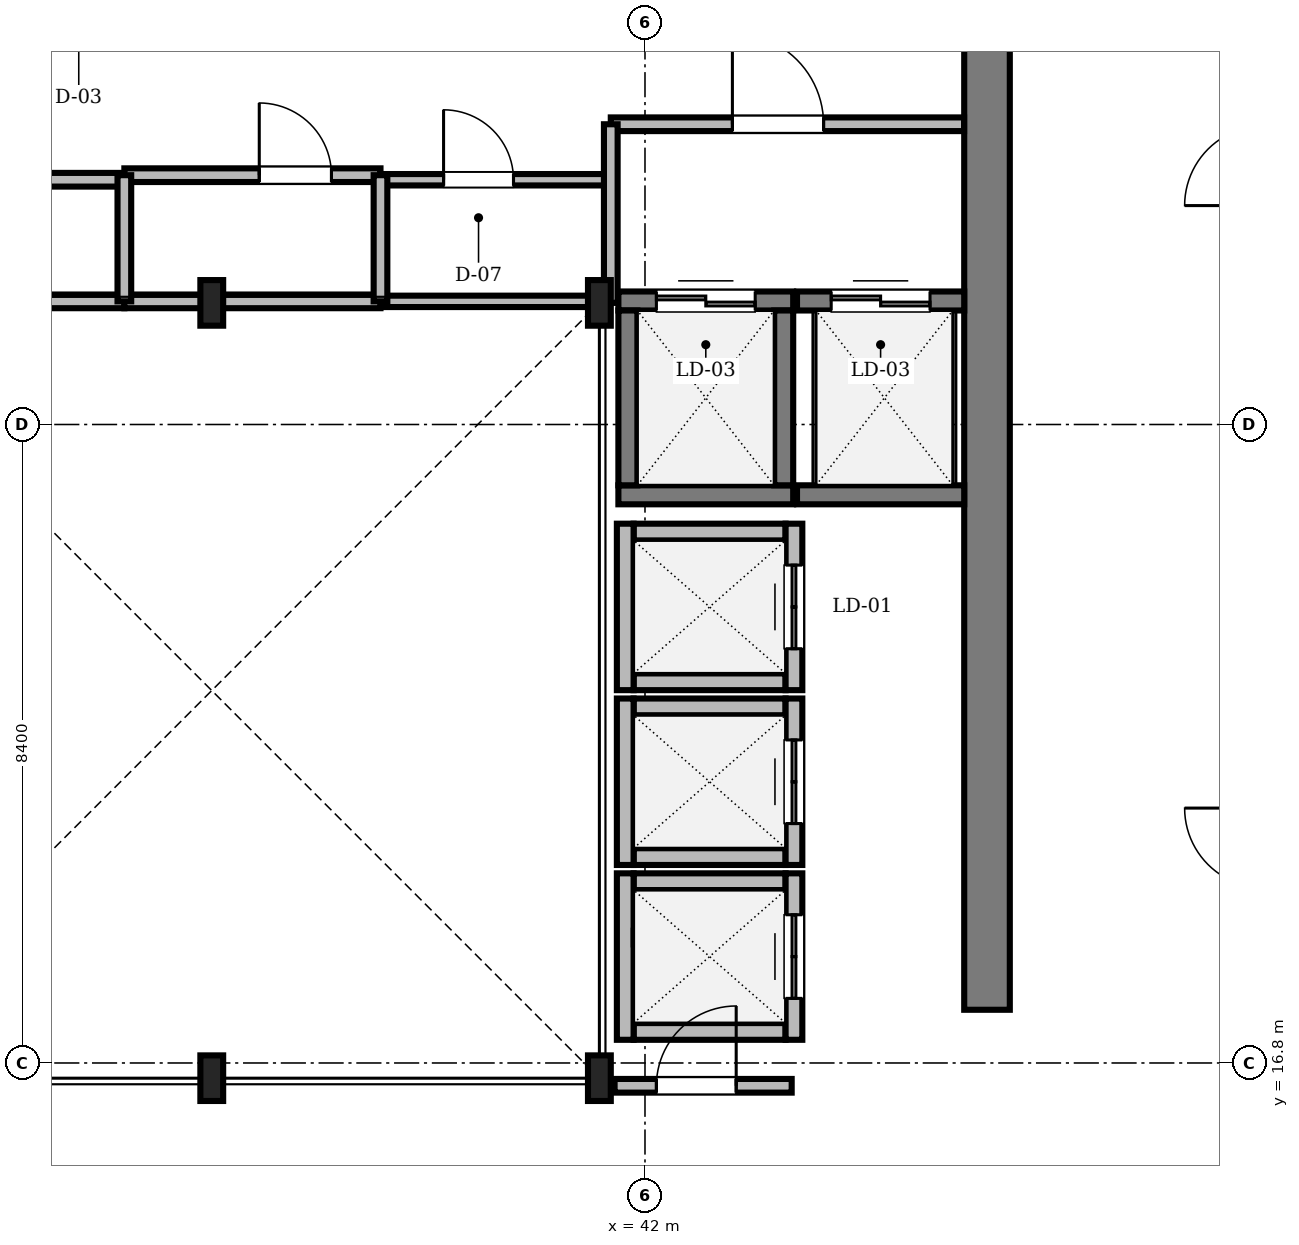
"""IFC4 building model, lengths in metres.
Left out: names, types, materials, properties, quantities, classifications, styles, units other than length and angle.
Written with IfcOpenShell. Run it as: python <this file> out.ifc"""

import sys

from ifc_helpers import new_model, si_unit, direction, frame, frame_2d, origin, origin_2d, place, context, subcontext, project, spatial, rectangle, i_section, extrude, source, transform, mapped, element, fill, save


model = new_model("IFC4")
c1 = context("Model", 3, precision=1e-05, world=origin(), true_north=direction((0.0, 1.0)))
c2 = subcontext(c1, "Body", "Model", "MODEL_VIEW")
j1 = project(units=[si_unit("LENGTHUNIT", "METRE"), si_unit("PLANEANGLEUNIT", "RADIAN")], contexts=[c1])
p1 = place(None, origin())
s1 = spatial("IfcSite", under=j1, at=p1, CompositionType="ELEMENT")
p2 = place(p1, origin())
s2 = spatial("IfcBuilding", under=s1, at=p2, CompositionType="ELEMENT")
p3 = place(p2, frame((0.0, 0.0, 278.25)))
s3 = spatial("IfcBuildingStorey", under=s2, at=p3, CompositionType="ELEMENT", Elevation=278.25)
m1 = source(origin(), c2, "Body", "SweptSolid", [
    extrude(rectangle(XDim=13.15, YDim=0.6, at=frame_2d((6.575, 0.0))), origin(), (0.0, 0.0, 1.0), 3.3),
])
p4 = place(p3, frame((46.5, 17.5, 0.0), z_axis=(0.0, 0.0, 1.0), x_axis=(0.0, 1.0, 0.0)))
e1 = element("IfcWall", 1, at=p4, inside=s3, PredefinedType="SHEAR", context=c2, shape_type="MappedRepresentation", body=[
    mapped(m1, transform((0.0, 0.0, 0.0), scale=1.0)),
])
m2 = source(origin(), c2, "Body", "SweptSolid", [
    extrude(i_section(OverallWidth=0.3, OverallDepth=0.6, WebThickness=0.015, FlangeThickness=0.03, FilletRadius=0.027, at=origin_2d()), origin(), (0.0, 0.0, 1.0), 3.3),
])
for number, where, z_axis, x_axis in (
    (2, (36.3, 16.6, 0.0), (0.0, 0.0, 1.0), (1.0, 0.0, 0.0)),
    (3, (41.4, 16.6, 0.0), (0.0, 0.0, 1.0), (1.0, 0.0, 0.0)),
    (4, (41.4, 26.8, 0.0), (0.0, 0.0, 1.0), (1.0, 0.0, 0.0)),
    (5, (36.3, 26.8, 0.0), (0.0, 0.0, 1.0), (1.0, 0.0, 0.0)),
):
    element("IfcColumn", number, at=place(p3, frame(where, z_axis=z_axis, x_axis=x_axis)), inside=s3, PredefinedType="COLUMN", context=c2, shape_type="MappedRepresentation", body=[
        mapped(m2, transform((0.0, 0.0, 0.0), scale=1.0)),
    ])
m3 = source(origin(), c2, "Body", "SweptSolid", [
    extrude(rectangle(XDim=2.0, YDim=0.22, at=frame_2d((1.0, 0.0))), origin(), (0.0, 0.0, 1.0), 3.3),
])
for number, where, z_axis, x_axis in (
    (6, (41.85, 21.815, 0.0), (0.0, 0.0, 1.0), (1.0, 0.0, 0.0)),
    (7, (41.85, 23.785, 0.0), (0.0, 0.0, 1.0), (1.0, 0.0, 0.0)),
):
    element("IfcWall", number, at=place(p3, frame(where, z_axis=z_axis, x_axis=x_axis)), inside=s3, PredefinedType="SOLIDWALL", context=c2, shape_type="MappedRepresentation", body=[
        mapped(m3, transform((0.0, 0.0, 0.0), scale=1.0)),
    ])
m4 = source(origin(), c2, "Body", "SweptSolid", [
    extrude(rectangle(XDim=2.19, YDim=0.22, at=frame_2d((1.095, 0.0))), origin(), (0.0, 0.0, 1.0), 3.3),
])
p5 = place(p3, frame((41.74, 21.705, 0.0), z_axis=(0.0, 0.0, 1.0), x_axis=(0.0, 1.0, 0.0)))
e8 = element("IfcWall", 8, at=p5, inside=s3, PredefinedType="SOLIDWALL", context=c2, shape_type="MappedRepresentation", body=[
    mapped(m4, transform((0.0, 0.0, 0.0), scale=1.0)),
])
p6 = place(p3, frame((43.96, 21.705, 0.0), z_axis=(0.0, 0.0, 1.0), x_axis=(0.0, 1.0, 0.0)))
e9 = element("IfcWall", 9, at=p6, inside=s3, PredefinedType="SOLIDWALL", context=c2, shape_type="MappedRepresentation", body=[
    mapped(m4, transform((0.0, 0.0, 0.0), scale=1.0)),
])
m5 = source(origin(), c2, "Body", "SweptSolid", [
    extrude(rectangle(XDim=1.1, YDim=2.2, at=frame_2d((0.55, 1.1))), frame((0.0, 0.12, 0.0), z_axis=(0.0, -1.0, 0.0), x_axis=(1.0, 0.0, 0.0)), (0.0, 0.0, 1.0), 0.24),
])
p7 = place(p6, frame((0.545, 0.0, 0.0)))
e10 = element("IfcOpeningElement", 10, at=p7, cuts=e9, PredefinedType="OPENING", context=c2, shape_type="MappedRepresentation", body=[
    mapped(m5, transform((0.0, 0.0, 0.0), scale=1.0)),
])
for number, where, z_axis, x_axis in (
    (11, (41.85, 19.515, 0.0), (0.0, 0.0, 1.0), (1.0, 0.0, 0.0)),
    (12, (41.85, 21.485, 0.0), (0.0, 0.0, 1.0), (1.0, 0.0, 0.0)),
):
    element("IfcWall", number, at=place(p3, frame(where, z_axis=z_axis, x_axis=x_axis)), inside=s3, PredefinedType="SOLIDWALL", context=c2, shape_type="MappedRepresentation", body=[
        mapped(m3, transform((0.0, 0.0, 0.0), scale=1.0)),
    ])
p8 = place(p3, frame((41.74, 19.405, 0.0), z_axis=(0.0, 0.0, 1.0), x_axis=(0.0, 1.0, 0.0)))
e13 = element("IfcWall", 13, at=p8, inside=s3, PredefinedType="SOLIDWALL", context=c2, shape_type="MappedRepresentation", body=[
    mapped(m4, transform((0.0, 0.0, 0.0), scale=1.0)),
])
p9 = place(p3, frame((43.96, 19.405, 0.0), z_axis=(0.0, 0.0, 1.0), x_axis=(0.0, 1.0, 0.0)))
e14 = element("IfcWall", 14, at=p9, inside=s3, PredefinedType="SOLIDWALL", context=c2, shape_type="MappedRepresentation", body=[
    mapped(m4, transform((0.0, 0.0, 0.0), scale=1.0)),
])
p10 = place(p9, frame((0.545, 0.0, 0.0)))
e15 = element("IfcOpeningElement", 15, at=p10, cuts=e14, PredefinedType="OPENING", context=c2, shape_type="MappedRepresentation", body=[
    mapped(m5, transform((0.0, 0.0, 0.0), scale=1.0)),
])
for number, where, z_axis, x_axis in (
    (16, (41.85, 17.215, 0.0), (0.0, 0.0, 1.0), (1.0, 0.0, 0.0)),
    (17, (41.85, 19.185, 0.0), (0.0, 0.0, 1.0), (1.0, 0.0, 0.0)),
):
    element("IfcWall", number, at=place(p3, frame(where, z_axis=z_axis, x_axis=x_axis)), inside=s3, PredefinedType="SOLIDWALL", context=c2, shape_type="MappedRepresentation", body=[
        mapped(m3, transform((0.0, 0.0, 0.0), scale=1.0)),
    ])
p11 = place(p3, frame((41.74, 17.105, 0.0), z_axis=(0.0, 0.0, 1.0), x_axis=(0.0, 1.0, 0.0)))
e18 = element("IfcWall", 18, at=p11, inside=s3, PredefinedType="SOLIDWALL", context=c2, shape_type="MappedRepresentation", body=[
    mapped(m4, transform((0.0, 0.0, 0.0), scale=1.0)),
])
p12 = place(p3, frame((43.96, 17.105, 0.0), z_axis=(0.0, 0.0, 1.0), x_axis=(0.0, 1.0, 0.0)))
e19 = element("IfcWall", 19, at=p12, inside=s3, PredefinedType="SOLIDWALL", context=c2, shape_type="MappedRepresentation", body=[
    mapped(m4, transform((0.0, 0.0, 0.0), scale=1.0)),
])
p13 = place(p12, frame((0.545, 0.0, 0.0)))
e20 = element("IfcOpeningElement", 20, at=p13, cuts=e19, PredefinedType="OPENING", context=c2, shape_type="MappedRepresentation", body=[
    mapped(m5, transform((0.0, 0.0, 0.0), scale=1.0)),
])
m6 = source(origin(), c2, "Body", "SweptSolid", [
    extrude(rectangle(XDim=2.3, YDim=0.25, at=frame_2d((1.15, 0.0))), origin(), (0.0, 0.0, 1.0), 3.3),
])
p14 = place(p3, frame((41.65, 24.275, 0.0), z_axis=(0.0, 0.0, 1.0), x_axis=(1.0, 0.0, 0.0)))
e21 = element("IfcWall", 21, at=p14, inside=s3, PredefinedType="SOLIDWALL", context=c2, shape_type="MappedRepresentation", body=[
    mapped(m6, transform((0.0, 0.0, 0.0), scale=1.0)),
])
p15 = place(p3, frame((41.65, 26.825, 0.0), z_axis=(0.0, 0.0, 1.0), x_axis=(1.0, 0.0, 0.0)))
e22 = element("IfcWall", 22, at=p15, inside=s3, PredefinedType="SOLIDWALL", context=c2, shape_type="MappedRepresentation", body=[
    mapped(m6, transform((0.0, 0.0, 0.0), scale=1.0)),
])
m7 = source(origin(), c2, "Body", "SweptSolid", [
    extrude(rectangle(XDim=1.3, YDim=2.3, at=frame_2d((0.65, 1.15))), frame((0.0, 0.135, 0.0), z_axis=(0.0, -1.0, 0.0), x_axis=(1.0, 0.0, 0.0)), (0.0, 0.0, 1.0), 0.27),
])
p16 = place(p15, frame((0.5, 0.0, 0.0)))
e23 = element("IfcOpeningElement", 23, at=p16, cuts=e22, PredefinedType="OPENING", context=c2, shape_type="MappedRepresentation", body=[
    mapped(m7, transform((0.0, 0.0, 0.0), scale=1.0)),
])
for number, where, z_axis, x_axis in (
    (24, (41.775, 24.4, 0.0), (0.0, 0.0, 1.0), (0.0, 1.0, 0.0)),
    (25, (43.825, 24.4, 0.0), (0.0, 0.0, 1.0), (0.0, 1.0, 0.0)),
):
    element("IfcWall", number, at=place(p3, frame(where, z_axis=z_axis, x_axis=x_axis)), inside=s3, PredefinedType="SOLIDWALL", context=c2, shape_type="MappedRepresentation", body=[
        mapped(m6, transform((0.0, 0.0, 0.0), scale=1.0)),
    ])
m8 = source(origin(), c2, "Body", "SweptSolid", [
    extrude(rectangle(XDim=2.2, YDim=0.25, at=frame_2d((1.1, 0.0))), origin(), (0.0, 0.0, 1.0), 3.3),
])
p17 = place(p3, frame((44.0, 24.275, 0.0), z_axis=(0.0, 0.0, 1.0), x_axis=(1.0, 0.0, 0.0)))
e26 = element("IfcWall", 26, at=p17, inside=s3, PredefinedType="SOLIDWALL", context=c2, shape_type="MappedRepresentation", body=[
    mapped(m8, transform((0.0, 0.0, 0.0), scale=1.0)),
])
p18 = place(p3, frame((44.0, 26.825, 0.0), z_axis=(0.0, 0.0, 1.0), x_axis=(1.0, 0.0, 0.0)))
e27 = element("IfcWall", 27, at=p18, inside=s3, PredefinedType="SOLIDWALL", context=c2, shape_type="MappedRepresentation", body=[
    mapped(m8, transform((0.0, 0.0, 0.0), scale=1.0)),
])
p19 = place(p18, frame((0.45, 0.0, 0.0)))
e28 = element("IfcOpeningElement", 28, at=p19, cuts=e27, PredefinedType="OPENING", context=c2, shape_type="MappedRepresentation", body=[
    mapped(m7, transform((0.0, 0.0, 0.0), scale=1.0)),
])
m9 = source(origin(), c2, "Body", "SweptSolid", [
    extrude(rectangle(XDim=4.648, YDim=0.18, at=frame_2d((2.324, 0.0))), origin(), (0.0, 0.0, 1.0), 2.932),
])
p20 = place(p3, frame((41.55, 29.15, 0.0), z_axis=(0.0, 0.0, 1.0), x_axis=(1.0, 0.0, 0.0)))
e29 = element("IfcWall", 29, at=p20, inside=s3, PredefinedType="PARTITIONING", context=c2, shape_type="MappedRepresentation", body=[
    mapped(m9, transform((0.0, 0.0, 0.0), scale=1.0)),
])
m10 = source(origin(), c2, "Body", "SweptSolid", [
    extrude(rectangle(XDim=1.2, YDim=2.2, at=frame_2d((0.6, 1.1))), frame((0.0, 0.1, 0.0), z_axis=(0.0, -1.0, 0.0), x_axis=(1.0, 0.0, 0.0)), (0.0, 0.0, 1.0), 0.2),
])
p21 = place(p20, frame((1.6, 0.0, 0.0)))
e30 = element("IfcOpeningElement", 30, at=p21, cuts=e29, PredefinedType="OPENING", context=c2, shape_type="MappedRepresentation", body=[
    mapped(m10, transform((0.0, 0.0, 0.0), scale=1.0)),
])
m11 = source(origin(), c2, "Body", "SweptSolid", [
    extrude(rectangle(XDim=3.7, YDim=0.18, at=frame_2d((1.85, 0.0))), origin(), (0.0, 0.0, 1.0), 2.932),
])
p22 = place(p3, frame((31.45, 28.42, 0.0), z_axis=(0.0, 0.0, 1.0), x_axis=(1.0, 0.0, 0.0)))
e31 = element("IfcWall", 31, at=p22, inside=s3, PredefinedType="PARTITIONING", context=c2, shape_type="MappedRepresentation", body=[
    mapped(m11, transform((0.0, 0.0, 0.0), scale=1.0)),
])
m12 = source(origin(), c2, "Body", "SweptSolid", [
    extrude(rectangle(XDim=0.92, YDim=2.1, at=frame_2d((0.46, 1.05))), frame((0.0, 0.1, 0.0), z_axis=(0.0, -1.0, 0.0), x_axis=(1.0, 0.0, 0.0)), (0.0, 0.0, 1.0), 0.2),
])
p23 = place(p22, frame((0.9, 0.0, 0.0)))
e32 = element("IfcOpeningElement", 32, at=p23, cuts=e31, PredefinedType="OPENING", context=c2, shape_type="MappedRepresentation", body=[
    mapped(m12, transform((0.0, 0.0, 0.0), scale=1.0)),
])
m13 = source(origin(), c2, "Body", "SweptSolid", [
    extrude(rectangle(XDim=3.37, YDim=0.18, at=frame_2d((1.685, 0.0))), origin(), (0.0, 0.0, 1.0), 3.3),
])
p24 = place(p3, frame((35.15, 28.48, 0.0), z_axis=(0.0, 0.0, 1.0), x_axis=(1.0, 0.0, 0.0)))
e33 = element("IfcWall", 33, at=p24, inside=s3, PredefinedType="PARTITIONING", context=c2, shape_type="MappedRepresentation", body=[
    mapped(m13, transform((0.0, 0.0, 0.0), scale=1.0)),
])
m14 = source(origin(), c2, "Body", "SweptSolid", [
    extrude(rectangle(XDim=0.95, YDim=2.15, at=frame_2d((0.475, 1.075))), frame((0.0, 0.1, 0.0), z_axis=(0.0, -1.0, 0.0), x_axis=(1.0, 0.0, 0.0)), (0.0, 0.0, 1.0), 0.2),
])
p25 = place(p24, frame((1.775, 0.0, 0.0)))
e34 = element("IfcOpeningElement", 34, at=p25, cuts=e33, PredefinedType="OPENING", context=c2, shape_type="MappedRepresentation", body=[
    mapped(m14, transform((0.0, 0.0, 0.0), scale=1.0)),
])
m15 = source(origin(), c2, "Body", "SweptSolid", [
    extrude(rectangle(XDim=3.0, YDim=0.15, at=frame_2d((1.5, 0.0))), origin(), (0.0, 0.0, 1.0), 3.3),
])
p26 = place(p3, frame((38.52, 28.42, 0.0), z_axis=(0.0, 0.0, 1.0), x_axis=(1.0, 0.0, 0.0)))
e35 = element("IfcWall", 35, at=p26, inside=s3, PredefinedType="PARTITIONING", context=c2, shape_type="MappedRepresentation", body=[
    mapped(m15, transform((0.0, 0.0, 0.0), scale=1.0)),
])
m16 = source(origin(), c2, "Body", "SweptSolid", [
    extrude(rectangle(XDim=0.92, YDim=2.1, at=frame_2d((0.46, 1.05))), frame((0.0, 0.085, 0.0), z_axis=(0.0, -1.0, 0.0), x_axis=(1.0, 0.0, 0.0)), (0.0, 0.0, 1.0), 0.17),
])
p27 = place(p26, frame((0.83, 0.0, 0.0)))
e36 = element("IfcOpeningElement", 36, at=p27, cuts=e35, PredefinedType="OPENING", context=c2, shape_type="MappedRepresentation", body=[
    mapped(m16, transform((0.0, 0.0, 0.0), scale=1.0)),
])
m17 = source(origin(), c2, "Body", "SweptSolid", [
    extrude(rectangle(XDim=2.33, YDim=0.18, at=frame_2d((1.165, 0.0))), origin(), (0.0, 0.0, 1.0), 2.742),
])
p28 = place(p3, frame((41.6, 16.5, 0.0), z_axis=(0.0, 0.0, 1.0), x_axis=(1.0, 0.0, 0.0)))
e37 = element("IfcWall", 37, at=p28, inside=s3, PredefinedType="PARTITIONING", context=c2, shape_type="MappedRepresentation", body=[
    mapped(m17, transform((0.0, 0.0, 0.0), scale=1.0)),
])
m18 = source(origin(), c2, "Body", "SweptSolid", [
    extrude(rectangle(XDim=1.05, YDim=2.2, at=frame_2d((0.525, 1.1))), frame((0.0, 0.1, 0.0), z_axis=(0.0, -1.0, 0.0), x_axis=(1.0, 0.0, 0.0)), (0.0, 0.0, 1.0), 0.2),
])
p29 = place(p28, frame((0.55, 0.0, 0.0)))
e38 = element("IfcOpeningElement", 38, at=p29, cuts=e37, PredefinedType="OPENING", context=c2, shape_type="MappedRepresentation", body=[
    mapped(m18, transform((0.0, 0.0, 0.0), scale=1.0)),
])
m19 = source(origin(), c2, "Body", "SweptSolid", [
    extrude(rectangle(XDim=3.7, YDim=0.18, at=frame_2d((1.85, 0.0))), origin(), (0.0, 0.0, 1.0), 2.842),
])
p30 = place(p3, frame((31.45, 26.82, 0.0), z_axis=(0.0, 0.0, 1.0), x_axis=(1.0, 0.0, 0.0)))
e39 = element("IfcWall", 39, at=p30, inside=s3, PredefinedType="PARTITIONING", context=c2, shape_type="MappedRepresentation", body=[
    mapped(m19, transform((0.0, 0.0, 0.0), scale=1.0)),
])
m20 = source(origin(), c2, "Body", "SweptSolid", [
    extrude(rectangle(XDim=3.37, YDim=0.18, at=frame_2d((1.685, 0.0))), origin(), (0.0, 0.0, 1.0), 2.842),
])
p31 = place(p3, frame((35.15, 26.82, 0.0), z_axis=(0.0, 0.0, 1.0), x_axis=(1.0, 0.0, 0.0)))
e40 = element("IfcWall", 40, at=p31, inside=s3, PredefinedType="PARTITIONING", context=c2, shape_type="MappedRepresentation", body=[
    mapped(m20, transform((0.0, 0.0, 0.0), scale=1.0)),
])
m21 = source(origin(), c2, "Body", "SweptSolid", [
    extrude(rectangle(XDim=3.0, YDim=0.15, at=frame_2d((1.5, 0.0))), origin(), (0.0, 0.0, 1.0), 2.842),
])
p32 = place(p3, frame((38.52, 26.82, 0.0), z_axis=(0.0, 0.0, 1.0), x_axis=(1.0, 0.0, 0.0)))
e41 = element("IfcWall", 41, at=p32, inside=s3, PredefinedType="PARTITIONING", context=c2, shape_type="MappedRepresentation", body=[
    mapped(m21, transform((0.0, 0.0, 0.0), scale=1.0)),
])
m22 = source(origin(), c2, "Body", "SweptSolid", [
    extrude(rectangle(XDim=2.35, YDim=0.18, at=frame_2d((1.175, 0.0))), origin(), (0.0, 0.0, 1.0), 2.932),
])
p33 = place(p3, frame((41.55, 26.8, 0.0), z_axis=(0.0, 0.0, 1.0), x_axis=(0.0, 1.0, 0.0)))
e42 = element("IfcWall", 42, at=p33, inside=s3, PredefinedType="PARTITIONING", context=c2, shape_type="MappedRepresentation", body=[
    mapped(m22, transform((0.0, 0.0, 0.0), scale=1.0)),
])
m23 = source(origin(), c2, "Body", "SweptSolid", [
    extrude(rectangle(XDim=1.858, YDim=0.18, at=frame_2d((0.929, 0.0))), origin(), (0.0, 0.0, 1.0), 3.3),
])
p34 = place(p3, frame((41.852, 18.45, 0.0), z_axis=(0.0, 0.0, 1.0), x_axis=(1.0, 0.0, 0.0)))
e43 = element("IfcWall", 43, at=p34, inside=s3, PredefinedType="PARTITIONING", context=c2, shape_type="MappedRepresentation", body=[
    mapped(m23, transform((0.0, 0.0, 0.0), scale=1.0)),
])
m24 = source(origin(), c2, "Body", "SweptSolid", [
    extrude(rectangle(XDim=1.66, YDim=0.18, at=frame_2d((0.83, 0.0))), origin(), (0.0, 0.0, 1.0), 2.842),
])
for number, where, z_axis, x_axis in (
    (44, (35.15, 26.82, 0.0), (0.0, 0.0, 1.0), (0.0, 1.0, 0.0)),
    (45, (38.52, 26.82, 0.0), (0.0, 0.0, 1.0), (0.0, 1.0, 0.0)),
):
    element("IfcWall", number, at=place(p3, frame(where, z_axis=z_axis, x_axis=x_axis)), inside=s3, PredefinedType="PARTITIONING", context=c2, shape_type="MappedRepresentation", body=[
        mapped(m24, transform((0.0, 0.0, 0.0), scale=1.0)),
    ])
m25 = source(origin(), c2, "Body", "SweptSolid", [
    extrude(rectangle(XDim=1.1, YDim=2.2, at=frame_2d((0.55, 1.1))), frame((0.0, 0.025, 0.0), z_axis=(0.0, -1.0, 0.0), x_axis=(1.0, 0.0, 0.0)), (0.0, 0.0, 1.0), 0.05),
])
p35 = place(p7, origin())
e46 = element("IfcDoor", 46, at=p35, inside=s3, OperationType="DOUBLE_DOOR_SLIDING", PredefinedType="DOOR", context=c2, shape_type="MappedRepresentation", body=[
    mapped(m25, transform((0.0, 0.0, 0.0), scale=1.0)),
])
fill(e10, e46)
p36 = place(p10, origin())
e47 = element("IfcDoor", 47, at=p36, inside=s3, OperationType="DOUBLE_DOOR_SLIDING", PredefinedType="DOOR", context=c2, shape_type="MappedRepresentation", body=[
    mapped(m25, transform((0.0, 0.0, 0.0), scale=1.0)),
])
fill(e15, e47)
p37 = place(p13, origin())
e48 = element("IfcDoor", 48, at=p37, inside=s3, OperationType="DOUBLE_DOOR_SLIDING", PredefinedType="DOOR", context=c2, shape_type="MappedRepresentation", body=[
    mapped(m25, transform((0.0, 0.0, 0.0), scale=1.0)),
])
fill(e20, e48)
m26 = source(origin(), c2, "Body", "SweptSolid", [
    extrude(rectangle(XDim=1.3, YDim=2.3, at=frame_2d((0.65, 1.15))), frame((0.0, 0.025, 0.0), z_axis=(0.0, -1.0, 0.0), x_axis=(1.0, 0.0, 0.0)), (0.0, 0.0, 1.0), 0.05),
])
p38 = place(p16, origin())
e49 = element("IfcDoor", 49, at=p38, inside=s3, OperationType="DOUBLE_DOOR_SLIDING", PredefinedType="DOOR", context=c2, shape_type="MappedRepresentation", body=[
    mapped(m26, transform((0.0, 0.0, 0.0), scale=1.0)),
])
fill(e23, e49)
p39 = place(p19, origin())
e50 = element("IfcDoor", 50, at=p39, inside=s3, OperationType="DOUBLE_DOOR_SLIDING", PredefinedType="DOOR", context=c2, shape_type="MappedRepresentation", body=[
    mapped(m26, transform((0.0, 0.0, 0.0), scale=1.0)),
])
fill(e28, e50)
m27 = source(origin(), c2, "Body", "SweptSolid", [
    extrude(rectangle(XDim=1.2, YDim=2.2, at=frame_2d((0.6, 1.1))), frame((0.0, 0.025, 0.0), z_axis=(0.0, -1.0, 0.0), x_axis=(1.0, 0.0, 0.0)), (0.0, 0.0, 1.0), 0.05),
])
p40 = place(p21, origin())
e51 = element("IfcDoor", 51, at=p40, inside=s3, OperationType="SINGLE_SWING_LEFT", PredefinedType="DOOR", context=c2, shape_type="MappedRepresentation", body=[
    mapped(m27, transform((0.0, 0.0, 0.0), scale=1.0)),
])
fill(e30, e51)
m28 = source(origin(), c2, "Body", "SweptSolid", [
    extrude(rectangle(XDim=0.95, YDim=2.15, at=frame_2d((0.475, 1.075))), frame((0.0, 0.025, 0.0), z_axis=(0.0, -1.0, 0.0), x_axis=(1.0, 0.0, 0.0)), (0.0, 0.0, 1.0), 0.05),
])
p41 = place(p25, origin())
e52 = element("IfcDoor", 52, at=p41, inside=s3, OperationType="SINGLE_SWING_LEFT", PredefinedType="DOOR", context=c2, shape_type="MappedRepresentation", body=[
    mapped(m28, transform((0.0, 0.0, 0.0), scale=1.0)),
])
fill(e34, e52)
m29 = source(origin(), c2, "Body", "SweptSolid", [
    extrude(rectangle(XDim=0.92, YDim=2.1, at=frame_2d((0.46, 1.05))), frame((0.0, 0.025, 0.0), z_axis=(0.0, -1.0, 0.0), x_axis=(1.0, 0.0, 0.0)), (0.0, 0.0, 1.0), 0.05),
])
p42 = place(p27, origin())
e53 = element("IfcDoor", 53, at=p42, inside=s3, OperationType="SINGLE_SWING_LEFT", PredefinedType="DOOR", context=c2, shape_type="MappedRepresentation", body=[
    mapped(m29, transform((0.0, 0.0, 0.0), scale=1.0)),
])
fill(e36, e53)
m30 = source(origin(), c2, "Body", "SweptSolid", [
    extrude(rectangle(XDim=1.05, YDim=2.2, at=frame_2d((0.525, 1.1))), frame((0.0, 0.025, 0.0), z_axis=(0.0, -1.0, 0.0), x_axis=(1.0, 0.0, 0.0)), (0.0, 0.0, 1.0), 0.05),
])
p43 = place(p29, origin())
e54 = element("IfcDoor", 54, at=p43, inside=s3, OperationType="SINGLE_SWING_RIGHT", PredefinedType="DOOR", context=c2, shape_type="MappedRepresentation", body=[
    mapped(m30, transform((0.0, 0.0, 0.0), scale=1.0)),
])
fill(e38, e54)
save(model, sys.argv[1])
